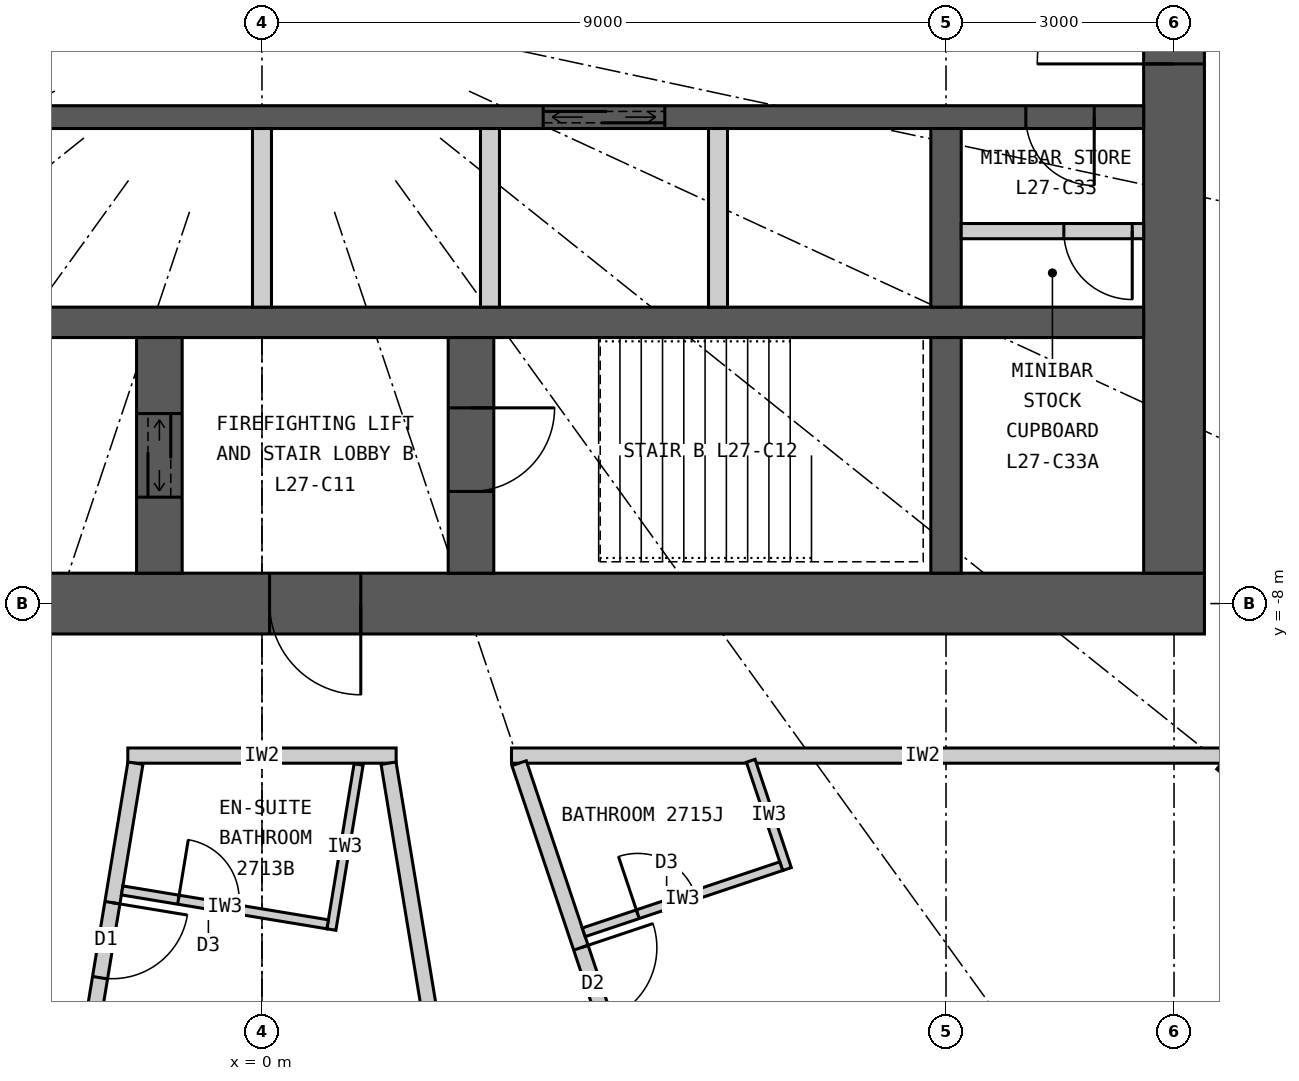
"""IFC4 building model, lengths in metres.
Left out: names, types, materials, properties, quantities, classifications, styles, units other than length and angle.
Written with IfcOpenShell. Run it as: python <this file> out.ifc"""

import sys

from ifc_helpers import new_model, si_unit, direction, frame, frame_2d, origin, place, context, subcontext, project, spatial, rectangle, extrude, element, fill, save


model = new_model("IFC4")
c1 = context("Model", 3, precision=1e-05, world=origin(), true_north=direction((0.0, 1.0)))
c2 = subcontext(c1, "Body", "Model", "MODEL_VIEW")
j1 = project(units=[si_unit("LENGTHUNIT", "METRE"), si_unit("PLANEANGLEUNIT", "RADIAN")], contexts=[c1])
p1 = place(None, origin())
s1 = spatial("IfcSite", under=j1, at=p1, CompositionType="ELEMENT")
p2 = place(p1, origin())
s2 = spatial("IfcBuilding", under=s1, at=p2, CompositionType="ELEMENT")
p3 = place(p2, frame((0.0, 0.0, 108.9)))
s3 = spatial("IfcBuildingStorey", under=s2, at=p3, CompositionType="ELEMENT", Elevation=108.9)
p4 = place(p3, frame((12.4, -8.0, 0.0), z_axis=(0.0, 0.0, 1.0), x_axis=(-1.0, 0.0, 0.0)))
e1 = element("IfcWall", 1, at=p4, inside=s3, PredefinedType="SHEAR", context=c2, shape_type="SweptSolid", body=[
    extrude(rectangle(XDim=24.8, YDim=0.8, at=frame_2d((12.4, 0.0))), origin(), (0.0, 0.0, 1.0), 3.3),
])
p5 = place(p4, frame((11.1, 0.0, 0.0)))
e2 = element("IfcOpeningElement", 2, at=p5, cuts=e1, PredefinedType="OPENING", context=c2, shape_type="SweptSolid", body=[
    extrude(rectangle(XDim=1.2, YDim=2.2, at=frame_2d((0.6, 1.1))), frame((0.0, 0.41, 0.0), z_axis=(0.0, -1.0, 0.0), x_axis=(1.0, 0.0, 0.0)), (0.0, 0.0, 1.0), 0.82),
])
p6 = place(p4, frame((18.7, 0.0, 0.0)))
e3 = element("IfcOpeningElement", 3, at=p6, cuts=e1, PredefinedType="OPENING", context=c2, shape_type="SweptSolid", body=[
    extrude(rectangle(XDim=0.9, YDim=2.2, at=frame_2d((0.45, 1.1))), frame((0.0, 0.41, 0.0), z_axis=(0.0, -1.0, 0.0), x_axis=(1.0, 0.0, 0.0)), (0.0, 0.0, 1.0), 0.82),
])
p7 = place(p3, frame((12.0, -7.6, 0.0), z_axis=(0.0, 0.0, 1.0), x_axis=(0.0, 1.0, 0.0)))
e4 = element("IfcWall", 4, at=p7, inside=s3, PredefinedType="SHEAR", context=c2, shape_type="SweptSolid", body=[
    extrude(rectangle(XDim=15.2, YDim=0.8, at=frame_2d((7.6, 0.0))), origin(), (0.0, 0.0, 1.0), 3.3),
])
p8 = place(p7, frame((6.7, 0.0, 0.0)))
e5 = element("IfcOpeningElement", 5, at=p8, cuts=e4, PredefinedType="OPENING", context=c2, shape_type="SweptSolid", body=[
    extrude(rectangle(XDim=1.8, YDim=2.2, at=frame_2d((0.9, 1.1))), frame((0.0, 0.41, 0.0), z_axis=(0.0, -1.0, 0.0), x_axis=(1.0, 0.0, 0.0)), (0.0, 0.0, 1.0), 0.82),
])
p9 = place(p3, frame((-11.6, -4.3, 0.0), z_axis=(0.0, 0.0, 1.0), x_axis=(1.0, 0.0, 0.0)))
e6 = element("IfcWall", 6, at=p9, inside=s3, PredefinedType="SHEAR", context=c2, shape_type="SweptSolid", body=[
    extrude(rectangle(XDim=23.2, YDim=0.4, at=frame_2d((11.6, 0.0))), origin(), (0.0, 0.0, 1.0), 3.3),
])
p10 = place(p3, frame((-11.6, -1.6, 0.0), z_axis=(0.0, 0.0, 1.0), x_axis=(1.0, 0.0, 0.0)))
e7 = element("IfcWall", 7, at=p10, inside=s3, PredefinedType="SHEAR", context=c2, shape_type="SweptSolid", body=[
    extrude(rectangle(XDim=23.2, YDim=0.3, at=frame_2d((11.6, 0.0))), origin(), (0.0, 0.0, 1.0), 3.3),
])
p11 = place(p10, frame((6.55, 0.0, 0.0)))
e8 = element("IfcOpeningElement", 8, at=p11, cuts=e7, PredefinedType="OPENING", context=c2, shape_type="SweptSolid", body=[
    extrude(rectangle(XDim=1.1, YDim=2.2, at=frame_2d((0.55, 1.1))), frame((0.0, 0.16, 0.0), z_axis=(0.0, -1.0, 0.0), x_axis=(1.0, 0.0, 0.0)), (0.0, 0.0, 1.0), 0.32),
])
p12 = place(p10, frame((15.3, 0.0, 0.0)))
e9 = element("IfcOpeningElement", 9, at=p12, cuts=e7, PredefinedType="OPENING", context=c2, shape_type="SweptSolid", body=[
    extrude(rectangle(XDim=1.6, YDim=2.4, at=frame_2d((0.8, 1.2))), frame((0.0, 0.16, 0.0), z_axis=(0.0, -1.0, 0.0), x_axis=(1.0, 0.0, 0.0)), (0.0, 0.0, 1.0), 0.32),
])
p13 = place(p10, frame((0.65, 0.0, 0.0)))
e10 = element("IfcOpeningElement", 10, at=p13, cuts=e7, PredefinedType="OPENING", context=c2, shape_type="SweptSolid", body=[
    extrude(rectangle(XDim=0.9, YDim=2.2, at=frame_2d((0.45, 1.1))), frame((0.0, 0.16, 0.0), z_axis=(0.0, -1.0, 0.0), x_axis=(1.0, 0.0, 0.0)), (0.0, 0.0, 1.0), 0.32),
])
p14 = place(p10, frame((3.65, 0.0, 0.0)))
e11 = element("IfcOpeningElement", 11, at=p14, cuts=e7, PredefinedType="OPENING", context=c2, shape_type="SweptSolid", body=[
    extrude(rectangle(XDim=0.9, YDim=2.2, at=frame_2d((0.45, 1.1))), frame((0.0, 0.16, 0.0), z_axis=(0.0, -1.0, 0.0), x_axis=(1.0, 0.0, 0.0)), (0.0, 0.0, 1.0), 0.32),
])
p15 = place(p10, frame((21.65, 0.0, 0.0)))
e12 = element("IfcOpeningElement", 12, at=p15, cuts=e7, PredefinedType="OPENING", context=c2, shape_type="SweptSolid", body=[
    extrude(rectangle(XDim=0.9, YDim=2.2, at=frame_2d((0.45, 1.1))), frame((0.0, 0.16, 0.0), z_axis=(0.0, -1.0, 0.0), x_axis=(1.0, 0.0, 0.0)), (0.0, 0.0, 1.0), 0.32),
])
p16 = place(p3, frame((9.0, -4.1, 0.0), z_axis=(0.0, 0.0, 1.0), x_axis=(0.0, 1.0, 0.0)))
e13 = element("IfcWall", 13, at=p16, inside=s3, PredefinedType="SHEAR", context=c2, shape_type="SweptSolid", body=[
    extrude(rectangle(XDim=2.35, YDim=0.4, at=frame_2d((1.175, 0.0))), origin(), (0.0, 0.0, 1.0), 3.3),
])
p17 = place(p3, frame((9.0, -7.6, 0.0), z_axis=(0.0, 0.0, 1.0), x_axis=(0.0, 1.0, 0.0)))
e14 = element("IfcWall", 14, at=p17, inside=s3, PredefinedType="SHEAR", context=c2, shape_type="SweptSolid", body=[
    extrude(rectangle(XDim=3.1, YDim=0.4, at=frame_2d((1.55, 0.0))), origin(), (0.0, 0.0, 1.0), 3.3),
])
p18 = place(p3, frame((2.75, -7.6, 0.0), z_axis=(0.0, 0.0, 1.0), x_axis=(0.0, 1.0, 0.0)))
e15 = element("IfcWall", 15, at=p18, inside=s3, PredefinedType="SHEAR", context=c2, shape_type="SweptSolid", body=[
    extrude(rectangle(XDim=3.1, YDim=0.6, at=frame_2d((1.55, 0.0))), origin(), (0.0, 0.0, 1.0), 3.3),
])
p19 = place(p18, frame((1.075, 0.0, 0.0)))
e16 = element("IfcOpeningElement", 16, at=p19, cuts=e15, PredefinedType="OPENING", context=c2, shape_type="SweptSolid", body=[
    extrude(rectangle(XDim=1.1, YDim=2.2, at=frame_2d((0.55, 1.1))), frame((0.0, 0.31, 0.0), z_axis=(0.0, -1.0, 0.0), x_axis=(1.0, 0.0, 0.0)), (0.0, 0.0, 1.0), 0.62),
])
p20 = place(p3, frame((-1.35, -7.6, 0.0), z_axis=(0.0, 0.0, 1.0), x_axis=(0.0, 1.0, 0.0)))
e17 = element("IfcWall", 17, at=p20, inside=s3, PredefinedType="SHEAR", context=c2, shape_type="SweptSolid", body=[
    extrude(rectangle(XDim=3.1, YDim=0.6, at=frame_2d((1.55, 0.0))), origin(), (0.0, 0.0, 1.0), 3.3),
])
p21 = place(p20, frame((1.0, 0.0, 0.0)))
e18 = element("IfcOpeningElement", 18, at=p21, cuts=e17, PredefinedType="OPENING", context=c2, shape_type="SweptSolid", body=[
    extrude(rectangle(XDim=1.1, YDim=2.2, at=frame_2d((0.55, 1.1))), frame((0.0, 0.31, 0.0), z_axis=(0.0, -1.0, 0.0), x_axis=(1.0, 0.0, 0.0)), (0.0, 0.0, 1.0), 0.62),
])
for number, where, z_axis, x_axis in (
    (19, (0.0, -4.1, 0.0), (0.0, 0.0, 1.0), (0.0, 1.0, 0.0)),
    (20, (3.0, -4.1, 0.0), (0.0, 0.0, 1.0), (0.0, 1.0, 0.0)),
    (21, (6.0, -4.1, 0.0), (0.0, 0.0, 1.0), (0.0, 1.0, 0.0)),
):
    element("IfcWall", number, at=place(p3, frame(where, z_axis=z_axis, x_axis=x_axis)), inside=s3, PredefinedType="PARTITIONING", context=c2, shape_type="SweptSolid", body=[
        extrude(rectangle(XDim=2.35, YDim=0.25, at=frame_2d((1.175, 0.0))), origin(), (0.0, 0.0, 1.0), 3.3),
    ])
p22 = place(p3, frame((14.1, -10.0, 0.0), z_axis=(0.0, 0.0, 1.0), x_axis=(-1.0, 0.0, 0.0)))
e22 = element("IfcWall", 22, at=p22, inside=s3, PredefinedType="PARTITIONING", context=c2, shape_type="SweptSolid", body=[
    extrude(rectangle(XDim=10.817, YDim=0.2, at=frame_2d((5.409, 0.0))), origin(), (0.0, 0.0, 1.0), 3.12),
])
p23 = place(p3, frame((1.765, -10.0, 0.0), z_axis=(0.0, 0.0, 1.0), x_axis=(-1.0, 0.0, 0.0)))
e23 = element("IfcWall", 23, at=p23, inside=s3, PredefinedType="PARTITIONING", context=c2, shape_type="SweptSolid", body=[
    extrude(rectangle(XDim=3.53, YDim=0.2, at=frame_2d((1.765, 0.0))), origin(), (0.0, 0.0, 1.0), 3.12),
])
p24 = place(p3, frame((-1.665, -10.1, 0.0), z_axis=(0.0, 0.0, 1.0), x_axis=(-0.162660519103, -0.986682094459, 0.0)))
e24 = element("IfcWall", 24, at=p24, inside=s3, PredefinedType="PARTITIONING", context=c2, shape_type="SweptSolid", body=[
    extrude(rectangle(XDim=9.111, YDim=0.2, at=frame_2d((4.555, 0.0))), origin(), (0.0, 0.0, 1.0), 3.12),
])
p25 = place(p24, frame((1.86, 0.0, 0.0)))
e25 = element("IfcOpeningElement", 25, at=p25, cuts=e24, PredefinedType="OPENING", context=c2, shape_type="SweptSolid", body=[
    extrude(rectangle(XDim=1.0, YDim=2.2, at=frame_2d((0.5, 1.1))), frame((0.0, 0.11, 0.0), z_axis=(0.0, -1.0, 0.0), x_axis=(1.0, 0.0, 0.0)), (0.0, 0.0, 1.0), 0.22),
])
p26 = place(p3, frame((1.665, -10.1, 0.0), z_axis=(0.0, 0.0, 1.0), x_axis=(0.162660519103, -0.986682094459, 0.0)))
e26 = element("IfcWall", 26, at=p26, inside=s3, PredefinedType="PARTITIONING", context=c2, shape_type="SweptSolid", body=[
    extrude(rectangle(XDim=9.111, YDim=0.2, at=frame_2d((4.555, 0.0))), origin(), (0.0, 0.0, 1.0), 3.12),
])
p27 = place(p3, frame((3.383, -10.1, 0.0), z_axis=(0.0, 0.0, 1.0), x_axis=(0.317603705574, -0.948223542318, 0.0)))
e27 = element("IfcWall", 27, at=p27, inside=s3, PredefinedType="PARTITIONING", context=c2, shape_type="SweptSolid", body=[
    extrude(rectangle(XDim=7.823, YDim=0.2, at=frame_2d((3.912, 0.0))), origin(), (0.0, 0.0, 1.0), 2.37),
])
p28 = place(p27, frame((2.56, 0.0, 0.0)))
e28 = element("IfcOpeningElement", 28, at=p28, cuts=e27, PredefinedType="OPENING", context=c2, shape_type="SweptSolid", body=[
    extrude(rectangle(XDim=1.0, YDim=2.2, at=frame_2d((0.5, 1.1))), frame((0.0, 0.11, 0.0), z_axis=(0.0, -1.0, 0.0), x_axis=(1.0, 0.0, 0.0)), (0.0, 0.0, 1.0), 0.22),
])
p29 = place(p3, frame((12.625, -10.1, 0.0), z_axis=(0.0, 0.0, 1.0), x_axis=(0.780863644897, -0.624701503182, 0.0)))
e29 = element("IfcWall", 29, at=p29, inside=s3, PredefinedType="PARTITIONING", context=c2, shape_type="SweptSolid", body=[
    extrude(rectangle(XDim=4.612, YDim=0.2, at=frame_2d((2.306, 0.0))), origin(), (0.0, 0.0, 1.0), 2.37),
])
p30 = place(p3, frame((1.271, -10.116, 0.0), z_axis=(0.0, 0.0, 1.0), x_axis=(-0.162672481395, -0.986680122328, 0.0)))
e30 = element("IfcWall", 30, at=p30, inside=s3, PredefinedType="PARTITIONING", context=c2, shape_type="SweptSolid", body=[
    extrude(rectangle(XDim=2.202, YDim=0.12, at=frame_2d((1.101, 0.0))), origin(), (0.0, 0.0, 1.0), 3.12),
])
p31 = place(p3, frame((-1.84, -11.774, 0.0), z_axis=(0.0, 0.0, 1.0), x_axis=(0.986676602341, -0.162693830222, 0.0)))
e31 = element("IfcWall", 31, at=p31, inside=s3, PredefinedType="PARTITIONING", context=c2, shape_type="SweptSolid", body=[
    extrude(rectangle(XDim=2.74, YDim=0.12, at=frame_2d((1.37, 0.0))), origin(), (0.0, 0.0, 1.0), 3.12),
])
p32 = place(p31, frame((0.75, 0.0, 0.0)))
e32 = element("IfcOpeningElement", 32, at=p32, cuts=e31, PredefinedType="OPENING", context=c2, shape_type="SweptSolid", body=[
    extrude(rectangle(XDim=0.8, YDim=2.1, at=frame_2d((0.4, 1.05))), frame((0.0, 0.07, 0.0), z_axis=(0.0, -1.0, 0.0), x_axis=(1.0, 0.0, 0.0)), (0.0, 0.0, 1.0), 0.14),
])
p33 = place(p3, frame((6.431, -10.068, 0.0), z_axis=(0.0, 0.0, 1.0), x_axis=(0.317592729703, -0.948227218571, 0.0)))
e33 = element("IfcWall", 33, at=p33, inside=s3, PredefinedType="PARTITIONING", context=c2, shape_type="SweptSolid", body=[
    extrude(rectangle(XDim=1.502, YDim=0.12, at=frame_2d((0.751, 0.0))), origin(), (0.0, 0.0, 1.0), 3.12),
])
p34 = place(p3, frame((4.234, -12.325, 0.0), z_axis=(0.0, 0.0, 1.0), x_axis=(0.948236840279, 0.317564001011, 0.0)))
e34 = element("IfcWall", 34, at=p34, inside=s3, PredefinedType="PARTITIONING", context=c2, shape_type="SweptSolid", body=[
    extrude(rectangle(XDim=2.74, YDim=0.12, at=frame_2d((1.37, 0.0))), origin(), (0.0, 0.0, 1.0), 3.12),
])
p35 = place(p34, frame((0.75, 0.0, 0.0)))
e35 = element("IfcOpeningElement", 35, at=p35, cuts=e34, PredefinedType="OPENING", context=c2, shape_type="SweptSolid", body=[
    extrude(rectangle(XDim=0.8, YDim=2.1, at=frame_2d((0.4, 1.05))), frame((0.0, 0.07, 0.0), z_axis=(0.0, -1.0, 0.0), x_axis=(1.0, 0.0, 0.0)), (0.0, 0.0, 1.0), 0.14),
])
p36 = place(p3, frame((9.2, -3.1, 0.0), z_axis=(0.0, 0.0, 1.0), x_axis=(1.0, 0.0, 0.0)))
e36 = element("IfcWall", 36, at=p36, inside=s3, PredefinedType="PARTITIONING", context=c2, shape_type="SweptSolid", body=[
    extrude(rectangle(XDim=2.4, YDim=0.2, at=frame_2d((1.2, 0.0))), origin(), (0.0, 0.0, 1.0), 3.12),
])
p37 = place(p36, frame((1.35, 0.0, 0.0)))
e37 = element("IfcOpeningElement", 37, at=p37, cuts=e36, PredefinedType="OPENING", context=c2, shape_type="SweptSolid", body=[
    extrude(rectangle(XDim=0.9, YDim=2.2, at=frame_2d((0.45, 1.1))), frame((0.0, 0.11, 0.0), z_axis=(0.0, -1.0, 0.0), x_axis=(1.0, 0.0, 0.0)), (0.0, 0.0, 1.0), 0.22),
])
p38 = place(p32, origin())
e38 = element("IfcDoor", 38, at=p38, inside=s3, OperationType="SINGLE_SWING_LEFT", PredefinedType="DOOR", context=c2, shape_type="SweptSolid", body=[
    extrude(rectangle(XDim=0.8, YDim=2.1, at=frame_2d((0.4, 1.05))), frame((0.0, 0.025, 0.0), z_axis=(0.0, -1.0, 0.0), x_axis=(1.0, 0.0, 0.0)), (0.0, 0.0, 1.0), 0.05),
])
fill(e32, e38)
p39 = place(p25, origin())
e39 = element("IfcDoor", 39, at=p39, inside=s3, OperationType="SINGLE_SWING_LEFT", PredefinedType="DOOR", context=c2, shape_type="SweptSolid", body=[
    extrude(rectangle(XDim=1.0, YDim=2.2, at=frame_2d((0.5, 1.1))), frame((0.0, 0.025, 0.0), z_axis=(0.0, -1.0, 0.0), x_axis=(1.0, 0.0, 0.0)), (0.0, 0.0, 1.0), 0.05),
])
fill(e25, e39)
p40 = place(p35, origin())
e40 = element("IfcDoor", 40, at=p40, inside=s3, OperationType="SINGLE_SWING_LEFT", PredefinedType="DOOR", context=c2, shape_type="SweptSolid", body=[
    extrude(rectangle(XDim=0.8, YDim=2.1, at=frame_2d((0.4, 1.05))), frame((0.0, 0.025, 0.0), z_axis=(0.0, -1.0, 0.0), x_axis=(1.0, 0.0, 0.0)), (0.0, 0.0, 1.0), 0.05),
])
fill(e35, e40)
p41 = place(p28, origin())
e41 = element("IfcDoor", 41, at=p41, inside=s3, OperationType="SINGLE_SWING_LEFT", PredefinedType="DOOR", context=c2, shape_type="SweptSolid", body=[
    extrude(rectangle(XDim=1.0, YDim=2.2, at=frame_2d((0.5, 1.1))), frame((0.0, 0.025, 0.0), z_axis=(0.0, -1.0, 0.0), x_axis=(1.0, 0.0, 0.0)), (0.0, 0.0, 1.0), 0.05),
])
fill(e28, e41)
p42 = place(p5, origin())
e42 = element("IfcDoor", 42, at=p42, inside=s3, OperationType="SINGLE_SWING_LEFT", PredefinedType="DOOR", context=c2, shape_type="SweptSolid", body=[
    extrude(rectangle(XDim=1.2, YDim=2.2, at=frame_2d((0.6, 1.1))), frame((0.0, 0.025, 0.0), z_axis=(0.0, -1.0, 0.0), x_axis=(1.0, 0.0, 0.0)), (0.0, 0.0, 1.0), 0.05),
])
fill(e2, e42)
p43 = place(p19, origin())
e43 = element("IfcDoor", 43, at=p43, inside=s3, OperationType="SINGLE_SWING_RIGHT", PredefinedType="DOOR", context=c2, shape_type="SweptSolid", body=[
    extrude(rectangle(XDim=1.1, YDim=2.2, at=frame_2d((0.55, 1.1))), frame((0.0, 0.025, 0.0), z_axis=(0.0, -1.0, 0.0), x_axis=(1.0, 0.0, 0.0)), (0.0, 0.0, 1.0), 0.05),
])
fill(e16, e43)
p44 = place(p21, origin())
e44 = element("IfcDoor", 44, at=p44, inside=s3, OperationType="DOUBLE_DOOR_SLIDING", PredefinedType="DOOR", context=c2, shape_type="SweptSolid", body=[
    extrude(rectangle(XDim=1.1, YDim=2.2, at=frame_2d((0.55, 1.1))), frame((0.0, 0.025, 0.0), z_axis=(0.0, -1.0, 0.0), x_axis=(1.0, 0.0, 0.0)), (0.0, 0.0, 1.0), 0.05),
])
fill(e18, e44)
p45 = place(p12, origin())
e45 = element("IfcDoor", 45, at=p45, inside=s3, OperationType="DOUBLE_DOOR_SLIDING", PredefinedType="DOOR", context=c2, shape_type="SweptSolid", body=[
    extrude(rectangle(XDim=1.6, YDim=2.4, at=frame_2d((0.8, 1.2))), frame((0.0, 0.025, 0.0), z_axis=(0.0, -1.0, 0.0), x_axis=(1.0, 0.0, 0.0)), (0.0, 0.0, 1.0), 0.05),
])
fill(e9, e45)
p46 = place(p37, origin())
e46 = element("IfcDoor", 46, at=p46, inside=s3, OperationType="SINGLE_SWING_RIGHT", PredefinedType="DOOR", context=c2, shape_type="SweptSolid", body=[
    extrude(rectangle(XDim=0.9, YDim=2.2, at=frame_2d((0.45, 1.1))), frame((0.0, 0.025, 0.0), z_axis=(0.0, -1.0, 0.0), x_axis=(1.0, 0.0, 0.0)), (0.0, 0.0, 1.0), 0.05),
])
fill(e37, e46)
p47 = place(p15, origin())
e47 = element("IfcDoor", 47, at=p47, inside=s3, OperationType="SINGLE_SWING_RIGHT", PredefinedType="DOOR", context=c2, shape_type="SweptSolid", body=[
    extrude(rectangle(XDim=0.9, YDim=2.2, at=frame_2d((0.45, 1.1))), frame((0.0, 0.025, 0.0), z_axis=(0.0, -1.0, 0.0), x_axis=(1.0, 0.0, 0.0)), (0.0, 0.0, 1.0), 0.05),
])
fill(e12, e47)
p48 = place(p8, origin())
e48 = element("IfcDoor", 48, at=p48, inside=s3, OperationType="DOUBLE_DOOR_DOUBLE_SWING", PredefinedType="DOOR", context=c2, shape_type="SweptSolid", body=[
    extrude(rectangle(XDim=1.8, YDim=2.2, at=frame_2d((0.9, 1.1))), frame((0.0, 0.025, 0.0), z_axis=(0.0, -1.0, 0.0), x_axis=(1.0, 0.0, 0.0)), (0.0, 0.0, 1.0), 0.05),
])
fill(e5, e48)
save(model, sys.argv[1])
